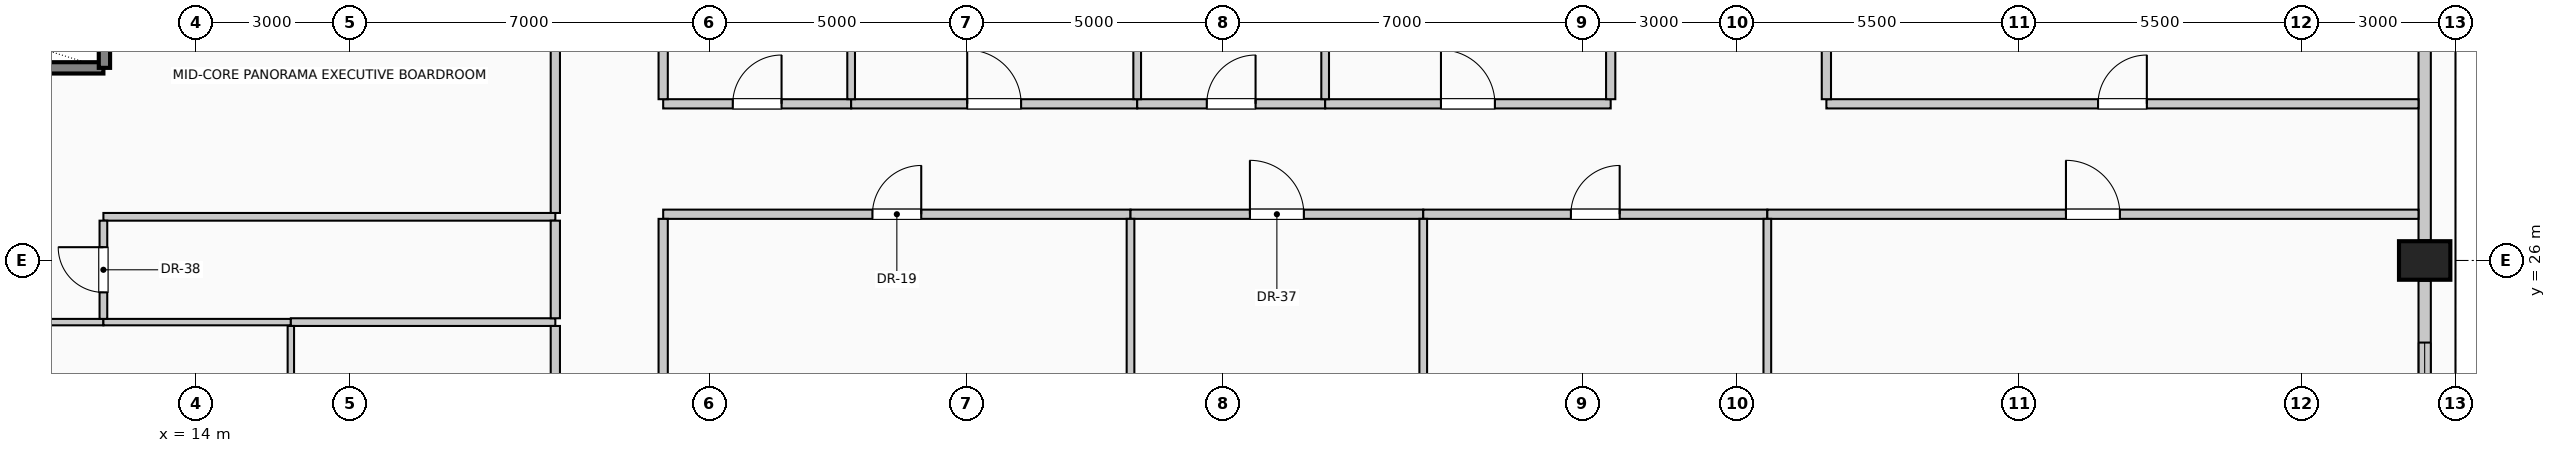
"""IFC4 building model, lengths in metres.
Left out: names, types, materials, properties, quantities, classifications, styles, units other than length and angle.
Written with IfcOpenShell. Run it as: python <this file> out.ifc"""

import sys

from ifc_helpers import new_model, si_unit, direction, frame, frame_2d, origin, origin_2d, place, context, subcontext, project, spatial, rectangle, extrude, element, fill, save


model = new_model("IFC4")
c1 = context("Model", 3, precision=1e-05, world=origin(), true_north=direction((0.0, 1.0)))
c2 = subcontext(c1, "Body", "Model", "MODEL_VIEW")
j1 = project(units=[si_unit("LENGTHUNIT", "METRE"), si_unit("PLANEANGLEUNIT", "RADIAN")], contexts=[c1])
p1 = place(None, origin())
s1 = spatial("IfcSite", under=j1, at=p1, CompositionType="ELEMENT")
p2 = place(p1, origin())
s2 = spatial("IfcBuilding", under=s1, at=p2, CompositionType="ELEMENT")
p3 = place(p2, frame((0.0, 0.0, 222.6)))
s3 = spatial("IfcBuildingStorey", under=s2, at=p3, CompositionType="ELEMENT", Elevation=222.6)
p4 = place(p3, frame((57.4, 26.0, 0.0), z_axis=(0.0, 0.0, 1.0), x_axis=(0.0, 1.0, 0.0)))
e1 = element("IfcColumn", 1, at=p4, inside=s3, PredefinedType="COLUMN", context=c2, shape_type="SweptSolid", body=[
    extrude(rectangle(XDim=0.75, YDim=1.0, at=origin_2d()), origin(), (0.0, 0.0, 1.0), 4.0),
])
p5 = place(p3, frame((57.4, 25.605, 0.0), z_axis=(0.0, 0.0, 1.0), x_axis=(0.0, -1.0, 0.0)))
e2 = element("IfcWall", 2, at=p5, inside=s3, PredefinedType="SOLIDWALL", context=c2, shape_type="SweptSolid", body=[
    extrude(rectangle(XDim=7.21, YDim=0.24, at=frame_2d((3.605, 0.0))), origin(), (0.0, 0.0, 1.0), 3.0),
])
p6 = place(p5, frame((1.203, 0.0, 0.42)))
e3 = element("IfcOpeningElement", 3, at=p6, cuts=e2, PredefinedType="OPENING", context=c2, shape_type="SweptSolid", body=[
    extrude(rectangle(XDim=1.8, YDim=2.2, at=frame_2d((0.9, 1.1))), frame((0.0, 0.13, 0.0), z_axis=(0.0, -1.0, 0.0), x_axis=(1.0, 0.0, 0.0)), (0.0, 0.0, 1.0), 0.26),
])
p7 = place(p5, frame((4.207, 0.0, 0.42)))
e4 = element("IfcOpeningElement", 4, at=p7, cuts=e2, PredefinedType="OPENING", context=c2, shape_type="SweptSolid", body=[
    extrude(rectangle(XDim=1.8, YDim=2.2, at=frame_2d((0.9, 1.1))), frame((0.0, 0.13, 0.0), z_axis=(0.0, -1.0, 0.0), x_axis=(1.0, 0.0, 0.0)), (0.0, 0.0, 1.0), 0.26),
])
p8 = place(p3, frame((57.4, 33.605, 0.0), z_axis=(0.0, 0.0, 1.0), x_axis=(0.0, -1.0, 0.0)))
e5 = element("IfcWall", 5, at=p8, inside=s3, PredefinedType="SOLIDWALL", context=c2, shape_type="SweptSolid", body=[
    extrude(rectangle(XDim=7.21, YDim=0.24, at=frame_2d((3.605, 0.0))), origin(), (0.0, 0.0, 1.0), 3.0),
])
p9 = place(p3, frame((3.55, 29.75, 0.0), z_axis=(0.0, 0.0, 1.0), x_axis=(1.0, 0.0, 0.0)))
e6 = element("IfcWall", 6, at=p9, inside=s3, PredefinedType="SOLIDWALL", context=c2, shape_type="SweptSolid", body=[
    extrude(rectangle(XDim=8.65, YDim=0.22, at=frame_2d((4.325, 0.0))), origin(), (0.0, 0.0, 1.0), 4.0),
])
p10 = place(p3, frame((12.22, 29.75, 0.0), z_axis=(0.0, 0.0, 1.0), x_axis=(0.0, 1.0, 0.0)))
e7 = element("IfcWall", 7, at=p10, inside=s3, PredefinedType="SOLIDWALL", context=c2, shape_type="SweptSolid", body=[
    extrude(rectangle(XDim=2.6, YDim=0.22, at=frame_2d((1.3, 0.0))), origin(), (0.0, 0.0, 1.0), 4.0),
])
p11 = place(p3, frame((9.8, 24.8, 0.0), z_axis=(0.0, 0.0, 1.0), x_axis=(1.0, 0.0, 0.0)))
e8 = element("IfcWall", 8, at=p11, inside=s3, PredefinedType="PARTITIONING", context=c2, shape_type="SweptSolid", body=[
    extrude(rectangle(XDim=2.4, YDim=0.125, at=frame_2d((1.2, 0.0))), origin(), (0.0, 0.0, 1.0), 3.75),
])
p12 = place(p3, frame((12.2, 24.8, 0.0), z_axis=(0.0, 0.0, 1.0), x_axis=(1.0, 0.0, 0.0)))
e9 = element("IfcWall", 9, at=p12, inside=s3, PredefinedType="PARTITIONING", context=c2, shape_type="SweptSolid", body=[
    extrude(rectangle(XDim=3.65, YDim=0.125, at=frame_2d((1.825, 0.0))), origin(), (0.0, 0.0, 1.0), 3.75),
])
p13 = place(p3, frame((15.85, 24.8, 0.0), z_axis=(0.0, 0.0, 1.0), x_axis=(1.0, 0.0, 0.0)))
e10 = element("IfcWall", 10, at=p13, inside=s3, PredefinedType="PARTITIONING", context=c2, shape_type="SweptSolid", body=[
    extrude(rectangle(XDim=5.15, YDim=0.15, at=frame_2d((2.575, 0.0))), origin(), (0.0, 0.0, 1.0), 3.75),
])
p14 = place(p3, frame((12.2, 26.85, 0.0), z_axis=(0.0, 0.0, 1.0), x_axis=(1.0, 0.0, 0.0)))
e11 = element("IfcWall", 11, at=p14, inside=s3, PredefinedType="PARTITIONING", context=c2, shape_type="SweptSolid", body=[
    extrude(rectangle(XDim=8.8, YDim=0.15, at=frame_2d((4.4, 0.0))), origin(), (0.0, 0.0, 1.0), 3.75),
])
p15 = place(p3, frame((23.1, 26.9, 0.0), z_axis=(0.0, 0.0, 1.0), x_axis=(1.0, 0.0, 0.0)))
e12 = element("IfcWall", 12, at=p15, inside=s3, PredefinedType="PARTITIONING", context=c2, shape_type="SweptSolid", body=[
    extrude(rectangle(XDim=9.1, YDim=0.18, at=frame_2d((4.55, 0.0))), origin(), (0.0, 0.0, 1.0), 3.75),
])
p16 = place(p15, frame((4.075, 0.0, 0.0)))
e13 = element("IfcOpeningElement", 13, at=p16, cuts=e12, PredefinedType="OPENING", context=c2, shape_type="SweptSolid", body=[
    extrude(rectangle(XDim=0.95, YDim=2.15, at=frame_2d((0.475, 1.075))), frame((0.0, 0.1, 0.0), z_axis=(0.0, -1.0, 0.0), x_axis=(1.0, 0.0, 0.0)), (0.0, 0.0, 1.0), 0.2),
])
p17 = place(p3, frame((32.2, 26.9, 0.0), z_axis=(0.0, 0.0, 1.0), x_axis=(1.0, 0.0, 0.0)))
e14 = element("IfcWall", 14, at=p17, inside=s3, PredefinedType="PARTITIONING", context=c2, shape_type="SweptSolid", body=[
    extrude(rectangle(XDim=5.7, YDim=0.18, at=frame_2d((2.85, 0.0))), origin(), (0.0, 0.0, 1.0), 3.75),
])
p18 = place(p17, frame((2.325, 0.0, 0.0)))
e15 = element("IfcOpeningElement", 15, at=p18, cuts=e14, PredefinedType="OPENING", context=c2, shape_type="SweptSolid", body=[
    extrude(rectangle(XDim=1.05, YDim=2.15, at=frame_2d((0.525, 1.075))), frame((0.0, 0.1, 0.0), z_axis=(0.0, -1.0, 0.0), x_axis=(1.0, 0.0, 0.0)), (0.0, 0.0, 1.0), 0.2),
])
p19 = place(p3, frame((37.9, 26.9, 0.0), z_axis=(0.0, 0.0, 1.0), x_axis=(1.0, 0.0, 0.0)))
e16 = element("IfcWall", 16, at=p19, inside=s3, PredefinedType="PARTITIONING", context=c2, shape_type="SweptSolid", body=[
    extrude(rectangle(XDim=6.7, YDim=0.18, at=frame_2d((3.35, 0.0))), origin(), (0.0, 0.0, 1.0), 3.75),
])
p20 = place(p19, frame((2.875, 0.0, 0.0)))
e17 = element("IfcOpeningElement", 17, at=p20, cuts=e16, PredefinedType="OPENING", context=c2, shape_type="SweptSolid", body=[
    extrude(rectangle(XDim=0.95, YDim=2.15, at=frame_2d((0.475, 1.075))), frame((0.0, 0.1, 0.0), z_axis=(0.0, -1.0, 0.0), x_axis=(1.0, 0.0, 0.0)), (0.0, 0.0, 1.0), 0.2),
])
p21 = place(p3, frame((44.6, 26.9, 0.0), z_axis=(0.0, 0.0, 1.0), x_axis=(1.0, 0.0, 0.0)))
e18 = element("IfcWall", 18, at=p21, inside=s3, PredefinedType="PARTITIONING", context=c2, shape_type="SweptSolid", body=[
    extrude(rectangle(XDim=12.68, YDim=0.18, at=frame_2d((6.34, 0.0))), origin(), (0.0, 0.0, 1.0), 3.75),
])
p22 = place(p21, frame((5.815, 0.0, 0.0)))
e19 = element("IfcOpeningElement", 19, at=p22, cuts=e18, PredefinedType="OPENING", context=c2, shape_type="SweptSolid", body=[
    extrude(rectangle(XDim=1.05, YDim=2.15, at=frame_2d((0.525, 1.075))), frame((0.0, 0.1, 0.0), z_axis=(0.0, -1.0, 0.0), x_axis=(1.0, 0.0, 0.0)), (0.0, 0.0, 1.0), 0.2),
])
p23 = place(p3, frame((23.1, 29.05, 0.0), z_axis=(0.0, 0.0, 1.0), x_axis=(1.0, 0.0, 0.0)))
e20 = element("IfcWall", 20, at=p23, inside=s3, PredefinedType="PARTITIONING", context=c2, shape_type="SweptSolid", body=[
    extrude(rectangle(XDim=3.66, YDim=0.18, at=frame_2d((1.83, 0.0))), origin(), (0.0, 0.0, 1.0), 3.75),
])
p24 = place(p23, frame((1.355, 0.0, 0.0)))
e21 = element("IfcOpeningElement", 21, at=p24, cuts=e20, PredefinedType="OPENING", context=c2, shape_type="SweptSolid", body=[
    extrude(rectangle(XDim=0.95, YDim=2.15, at=frame_2d((0.475, 1.075))), frame((0.0, 0.1, 0.0), z_axis=(0.0, -1.0, 0.0), x_axis=(1.0, 0.0, 0.0)), (0.0, 0.0, 1.0), 0.2),
])
p25 = place(p3, frame((26.76, 29.05, 0.0), z_axis=(0.0, 0.0, 1.0), x_axis=(1.0, 0.0, 0.0)))
e22 = element("IfcWall", 22, at=p25, inside=s3, PredefinedType="PARTITIONING", context=c2, shape_type="SweptSolid", body=[
    extrude(rectangle(XDim=5.57, YDim=0.18, at=frame_2d((2.785, 0.0))), origin(), (0.0, 0.0, 1.0), 3.75),
])
p26 = place(p25, frame((2.26, 0.0, 0.0)))
e23 = element("IfcOpeningElement", 23, at=p26, cuts=e22, PredefinedType="OPENING", context=c2, shape_type="SweptSolid", body=[
    extrude(rectangle(XDim=1.05, YDim=2.15, at=frame_2d((0.525, 1.075))), frame((0.0, 0.1, 0.0), z_axis=(0.0, -1.0, 0.0), x_axis=(1.0, 0.0, 0.0)), (0.0, 0.0, 1.0), 0.2),
])
p27 = place(p3, frame((32.33, 29.05, 0.0), z_axis=(0.0, 0.0, 1.0), x_axis=(1.0, 0.0, 0.0)))
e24 = element("IfcWall", 24, at=p27, inside=s3, PredefinedType="PARTITIONING", context=c2, shape_type="SweptSolid", body=[
    extrude(rectangle(XDim=3.66, YDim=0.18, at=frame_2d((1.83, 0.0))), origin(), (0.0, 0.0, 1.0), 3.75),
])
p28 = place(p27, frame((1.355, 0.0, 0.0)))
e25 = element("IfcOpeningElement", 25, at=p28, cuts=e24, PredefinedType="OPENING", context=c2, shape_type="SweptSolid", body=[
    extrude(rectangle(XDim=0.95, YDim=2.15, at=frame_2d((0.475, 1.075))), frame((0.0, 0.1, 0.0), z_axis=(0.0, -1.0, 0.0), x_axis=(1.0, 0.0, 0.0)), (0.0, 0.0, 1.0), 0.2),
])
p29 = place(p3, frame((35.99, 29.05, 0.0), z_axis=(0.0, 0.0, 1.0), x_axis=(1.0, 0.0, 0.0)))
e26 = element("IfcWall", 26, at=p29, inside=s3, PredefinedType="PARTITIONING", context=c2, shape_type="SweptSolid", body=[
    extrude(rectangle(XDim=5.56, YDim=0.18, at=frame_2d((2.78, 0.0))), origin(), (0.0, 0.0, 1.0), 3.75),
])
p30 = place(p29, frame((2.255, 0.0, 0.0)))
e27 = element("IfcOpeningElement", 27, at=p30, cuts=e26, PredefinedType="OPENING", context=c2, shape_type="SweptSolid", body=[
    extrude(rectangle(XDim=1.05, YDim=2.15, at=frame_2d((0.525, 1.075))), frame((0.0, 0.1, 0.0), z_axis=(0.0, -1.0, 0.0), x_axis=(1.0, 0.0, 0.0)), (0.0, 0.0, 1.0), 0.2),
])
p31 = place(p3, frame((45.75, 29.05, 0.0), z_axis=(0.0, 0.0, 1.0), x_axis=(1.0, 0.0, 0.0)))
e28 = element("IfcWall", 28, at=p31, inside=s3, PredefinedType="PARTITIONING", context=c2, shape_type="SweptSolid", body=[
    extrude(rectangle(XDim=11.53, YDim=0.18, at=frame_2d((5.765, 0.0))), origin(), (0.0, 0.0, 1.0), 3.75),
])
p32 = place(p31, frame((5.29, 0.0, 0.0)))
e29 = element("IfcOpeningElement", 29, at=p32, cuts=e28, PredefinedType="OPENING", context=c2, shape_type="SweptSolid", body=[
    extrude(rectangle(XDim=0.95, YDim=2.15, at=frame_2d((0.475, 1.075))), frame((0.0, 0.1, 0.0), z_axis=(0.0, -1.0, 0.0), x_axis=(1.0, 0.0, 0.0)), (0.0, 0.0, 1.0), 0.2),
])
p33 = place(p3, frame((12.2, 24.863, 0.0), z_axis=(0.0, 0.0, 1.0), x_axis=(0.0, 1.0, 0.0)))
e30 = element("IfcWall", 30, at=p33, inside=s3, PredefinedType="PARTITIONING", context=c2, shape_type="SweptSolid", body=[
    extrude(rectangle(XDim=1.912, YDim=0.15, at=frame_2d((0.956, 0.0))), origin(), (0.0, 0.0, 1.0), 3.75),
])
p34 = place(p33, frame((0.516, 0.0, 0.0)))
e31 = element("IfcOpeningElement", 31, at=p34, cuts=e30, PredefinedType="OPENING", context=c2, shape_type="SweptSolid", body=[
    extrude(rectangle(XDim=0.88, YDim=2.1, at=frame_2d((0.44, 1.05))), frame((0.0, 0.085, 0.0), z_axis=(0.0, -1.0, 0.0), x_axis=(1.0, 0.0, 0.0)), (0.0, 0.0, 1.0), 0.17),
])
p35 = place(p3, frame((15.85, 17.39, 0.0), z_axis=(0.0, 0.0, 1.0), x_axis=(0.0, 1.0, 0.0)))
e32 = element("IfcWall", 32, at=p35, inside=s3, PredefinedType="PARTITIONING", context=c2, shape_type="SweptSolid", body=[
    extrude(rectangle(XDim=7.335, YDim=0.125, at=frame_2d((3.667, 0.0))), origin(), (0.0, 0.0, 1.0), 3.75),
])
p36 = place(p3, frame((21.0, 17.39, 0.0), z_axis=(0.0, 0.0, 1.0), x_axis=(0.0, 1.0, 0.0)))
e33 = element("IfcWall", 33, at=p36, inside=s3, PredefinedType="PARTITIONING", context=c2, shape_type="SweptSolid", body=[
    extrude(rectangle(XDim=7.335, YDim=0.18, at=frame_2d((3.667, 0.0))), origin(), (0.0, 0.0, 1.0), 3.75),
])
p37 = place(p3, frame((21.0, 24.875, 0.0), z_axis=(0.0, 0.0, 1.0), x_axis=(0.0, 1.0, 0.0)))
e34 = element("IfcWall", 34, at=p37, inside=s3, PredefinedType="PARTITIONING", context=c2, shape_type="SweptSolid", body=[
    extrude(rectangle(XDim=1.9, YDim=0.18, at=frame_2d((0.95, 0.0))), origin(), (0.0, 0.0, 1.0), 3.75),
])
p38 = place(p3, frame((21.0, 26.925, 0.0), z_axis=(0.0, 0.0, 1.0), x_axis=(0.0, 1.0, 0.0)))
e35 = element("IfcWall", 35, at=p38, inside=s3, PredefinedType="PARTITIONING", context=c2, shape_type="SweptSolid", body=[
    extrude(rectangle(XDim=5.335, YDim=0.18, at=frame_2d((2.667, 0.0))), origin(), (0.0, 0.0, 1.0), 3.75),
])
p39 = place(p3, frame((23.1, 17.3, 0.0), z_axis=(0.0, 0.0, 1.0), x_axis=(0.0, 1.0, 0.0)))
e36 = element("IfcWall", 36, at=p39, inside=s3, PredefinedType="PARTITIONING", context=c2, shape_type="SweptSolid", body=[
    extrude(rectangle(XDim=9.51, YDim=0.18, at=frame_2d((4.755, 0.0))), origin(), (0.0, 0.0, 1.0), 3.75),
])
p40 = place(p3, frame((23.1, 29.14, 0.0), z_axis=(0.0, 0.0, 1.0), x_axis=(0.0, 1.0, 0.0)))
e37 = element("IfcWall", 37, at=p40, inside=s3, PredefinedType="PARTITIONING", context=c2, shape_type="SweptSolid", body=[
    extrude(rectangle(XDim=3.12, YDim=0.18, at=frame_2d((1.56, 0.0))), origin(), (0.0, 0.0, 1.0), 3.75),
])
p41 = place(p3, frame((26.76, 29.14, 0.0), z_axis=(0.0, 0.0, 1.0), x_axis=(0.0, 1.0, 0.0)))
e38 = element("IfcWall", 38, at=p41, inside=s3, PredefinedType="PARTITIONING", context=c2, shape_type="SweptSolid", body=[
    extrude(rectangle(XDim=16.14, YDim=0.15, at=frame_2d((8.07, 0.0))), origin(), (0.0, 0.0, 1.0), 3.75),
])
p42 = place(p3, frame((32.2, 0.72, 0.0), z_axis=(0.0, 0.0, 1.0), x_axis=(0.0, 1.0, 0.0)))
e39 = element("IfcWall", 39, at=p42, inside=s3, PredefinedType="PARTITIONING", context=c2, shape_type="SweptSolid", body=[
    extrude(rectangle(XDim=26.09, YDim=0.15, at=frame_2d((13.045, 0.0))), origin(), (0.0, 0.0, 1.0), 3.75),
])
for number, where, z_axis, x_axis in (
    (40, (32.33, 29.14, 0.0), (0.0, 0.0, 1.0), (0.0, 1.0, 0.0)),
    (41, (35.99, 29.14, 0.0), (0.0, 0.0, 1.0), (0.0, 1.0, 0.0)),
):
    element("IfcWall", number, at=place(p3, frame(where, z_axis=z_axis, x_axis=x_axis)), inside=s3, PredefinedType="PARTITIONING", context=c2, shape_type="SweptSolid", body=[
        extrude(rectangle(XDim=16.14, YDim=0.15, at=frame_2d((8.07, 0.0))), origin(), (0.0, 0.0, 1.0), 3.75),
    ])
p43 = place(p3, frame((37.9, 0.72, 0.0), z_axis=(0.0, 0.0, 1.0), x_axis=(0.0, 1.0, 0.0)))
e42 = element("IfcWall", 42, at=p43, inside=s3, PredefinedType="PARTITIONING", context=c2, shape_type="SweptSolid", body=[
    extrude(rectangle(XDim=26.09, YDim=0.15, at=frame_2d((13.045, 0.0))), origin(), (0.0, 0.0, 1.0), 3.75),
])
p44 = place(p3, frame((41.55, 29.14, 0.0), z_axis=(0.0, 0.0, 1.0), x_axis=(0.0, 1.0, 0.0)))
e43 = element("IfcWall", 43, at=p44, inside=s3, PredefinedType="PARTITIONING", context=c2, shape_type="SweptSolid", body=[
    extrude(rectangle(XDim=3.21, YDim=0.18, at=frame_2d((1.605, 0.0))), origin(), (0.0, 0.0, 1.0), 3.145),
])
p45 = place(p3, frame((44.6, 0.72, 0.0), z_axis=(0.0, 0.0, 1.0), x_axis=(0.0, 1.0, 0.0)))
e44 = element("IfcWall", 44, at=p45, inside=s3, PredefinedType="PARTITIONING", context=c2, shape_type="SweptSolid", body=[
    extrude(rectangle(XDim=26.09, YDim=0.15, at=frame_2d((13.045, 0.0))), origin(), (0.0, 0.0, 1.0), 3.75),
])
p46 = place(p3, frame((45.75, 29.14, 0.0), z_axis=(0.0, 0.0, 1.0), x_axis=(0.0, 1.0, 0.0)))
e45 = element("IfcWall", 45, at=p46, inside=s3, PredefinedType="PARTITIONING", context=c2, shape_type="SweptSolid", body=[
    extrude(rectangle(XDim=3.135, YDim=0.18, at=frame_2d((1.567, 0.0))), origin(), (0.0, 0.0, 1.0), 3.75),
])
p47 = place(p6, origin())
e46 = element("IfcWindow", 46, at=p47, inside=s3, PartitioningType="SINGLE_PANEL", PredefinedType="WINDOW", context=c2, shape_type="SweptSolid", body=[
    extrude(rectangle(XDim=1.8, YDim=2.2, at=frame_2d((0.9, 1.1))), frame((0.0, 0.03, 0.0), z_axis=(0.0, -1.0, 0.0), x_axis=(1.0, 0.0, 0.0)), (0.0, 0.0, 1.0), 0.06),
])
fill(e3, e46)
p48 = place(p16, origin())
e47 = element("IfcDoor", 47, at=p48, inside=s3, OperationType="SINGLE_SWING_RIGHT", PredefinedType="DOOR", context=c2, shape_type="SweptSolid", body=[
    extrude(rectangle(XDim=0.95, YDim=2.15, at=frame_2d((0.475, 1.075))), frame((0.0, 0.025, 0.0), z_axis=(0.0, -1.0, 0.0), x_axis=(1.0, 0.0, 0.0)), (0.0, 0.0, 1.0), 0.05),
])
fill(e13, e47)
p49 = place(p18, origin())
e48 = element("IfcDoor", 48, at=p49, inside=s3, OperationType="SINGLE_SWING_LEFT", PredefinedType="DOOR", context=c2, shape_type="SweptSolid", body=[
    extrude(rectangle(XDim=1.05, YDim=2.15, at=frame_2d((0.525, 1.075))), frame((0.0, 0.025, 0.0), z_axis=(0.0, -1.0, 0.0), x_axis=(1.0, 0.0, 0.0)), (0.0, 0.0, 1.0), 0.05),
])
fill(e15, e48)
p50 = place(p20, origin())
e49 = element("IfcDoor", 49, at=p50, inside=s3, OperationType="SINGLE_SWING_RIGHT", PredefinedType="DOOR", context=c2, shape_type="SweptSolid", body=[
    extrude(rectangle(XDim=0.95, YDim=2.15, at=frame_2d((0.475, 1.075))), frame((0.0, 0.025, 0.0), z_axis=(0.0, -1.0, 0.0), x_axis=(1.0, 0.0, 0.0)), (0.0, 0.0, 1.0), 0.05),
])
fill(e17, e49)
p51 = place(p22, origin())
e50 = element("IfcDoor", 50, at=p51, inside=s3, OperationType="SINGLE_SWING_LEFT", PredefinedType="DOOR", context=c2, shape_type="SweptSolid", body=[
    extrude(rectangle(XDim=1.05, YDim=2.15, at=frame_2d((0.525, 1.075))), frame((0.0, 0.025, 0.0), z_axis=(0.0, -1.0, 0.0), x_axis=(1.0, 0.0, 0.0)), (0.0, 0.0, 1.0), 0.05),
])
fill(e19, e50)
p52 = place(p24, origin())
e51 = element("IfcDoor", 51, at=p52, inside=s3, OperationType="SINGLE_SWING_RIGHT", PredefinedType="DOOR", context=c2, shape_type="SweptSolid", body=[
    extrude(rectangle(XDim=0.95, YDim=2.15, at=frame_2d((0.475, 1.075))), frame((0.0, 0.025, 0.0), z_axis=(0.0, -1.0, 0.0), x_axis=(1.0, 0.0, 0.0)), (0.0, 0.0, 1.0), 0.05),
])
fill(e21, e51)
p53 = place(p26, origin())
e52 = element("IfcDoor", 52, at=p53, inside=s3, OperationType="SINGLE_SWING_LEFT", PredefinedType="DOOR", context=c2, shape_type="SweptSolid", body=[
    extrude(rectangle(XDim=1.05, YDim=2.15, at=frame_2d((0.525, 1.075))), frame((0.0, 0.025, 0.0), z_axis=(0.0, -1.0, 0.0), x_axis=(1.0, 0.0, 0.0)), (0.0, 0.0, 1.0), 0.05),
])
fill(e23, e52)
p54 = place(p28, origin())
e53 = element("IfcDoor", 53, at=p54, inside=s3, OperationType="SINGLE_SWING_RIGHT", PredefinedType="DOOR", context=c2, shape_type="SweptSolid", body=[
    extrude(rectangle(XDim=0.95, YDim=2.15, at=frame_2d((0.475, 1.075))), frame((0.0, 0.025, 0.0), z_axis=(0.0, -1.0, 0.0), x_axis=(1.0, 0.0, 0.0)), (0.0, 0.0, 1.0), 0.05),
])
fill(e25, e53)
p55 = place(p30, origin())
e54 = element("IfcDoor", 54, at=p55, inside=s3, OperationType="SINGLE_SWING_LEFT", PredefinedType="DOOR", context=c2, shape_type="SweptSolid", body=[
    extrude(rectangle(XDim=1.05, YDim=2.15, at=frame_2d((0.525, 1.075))), frame((0.0, 0.025, 0.0), z_axis=(0.0, -1.0, 0.0), x_axis=(1.0, 0.0, 0.0)), (0.0, 0.0, 1.0), 0.05),
])
fill(e27, e54)
p56 = place(p32, origin())
e55 = element("IfcDoor", 55, at=p56, inside=s3, OperationType="SINGLE_SWING_RIGHT", PredefinedType="DOOR", context=c2, shape_type="SweptSolid", body=[
    extrude(rectangle(XDim=0.95, YDim=2.15, at=frame_2d((0.475, 1.075))), frame((0.0, 0.025, 0.0), z_axis=(0.0, -1.0, 0.0), x_axis=(1.0, 0.0, 0.0)), (0.0, 0.0, 1.0), 0.05),
])
fill(e29, e55)
p57 = place(p34, origin())
e56 = element("IfcDoor", 56, at=p57, inside=s3, OperationType="SINGLE_SWING_RIGHT", PredefinedType="DOOR", context=c2, shape_type="SweptSolid", body=[
    extrude(rectangle(XDim=0.88, YDim=2.1, at=frame_2d((0.44, 1.05))), frame((0.0, 0.025, 0.0), z_axis=(0.0, -1.0, 0.0), x_axis=(1.0, 0.0, 0.0)), (0.0, 0.0, 1.0), 0.05),
])
fill(e31, e56)
save(model, sys.argv[1])
